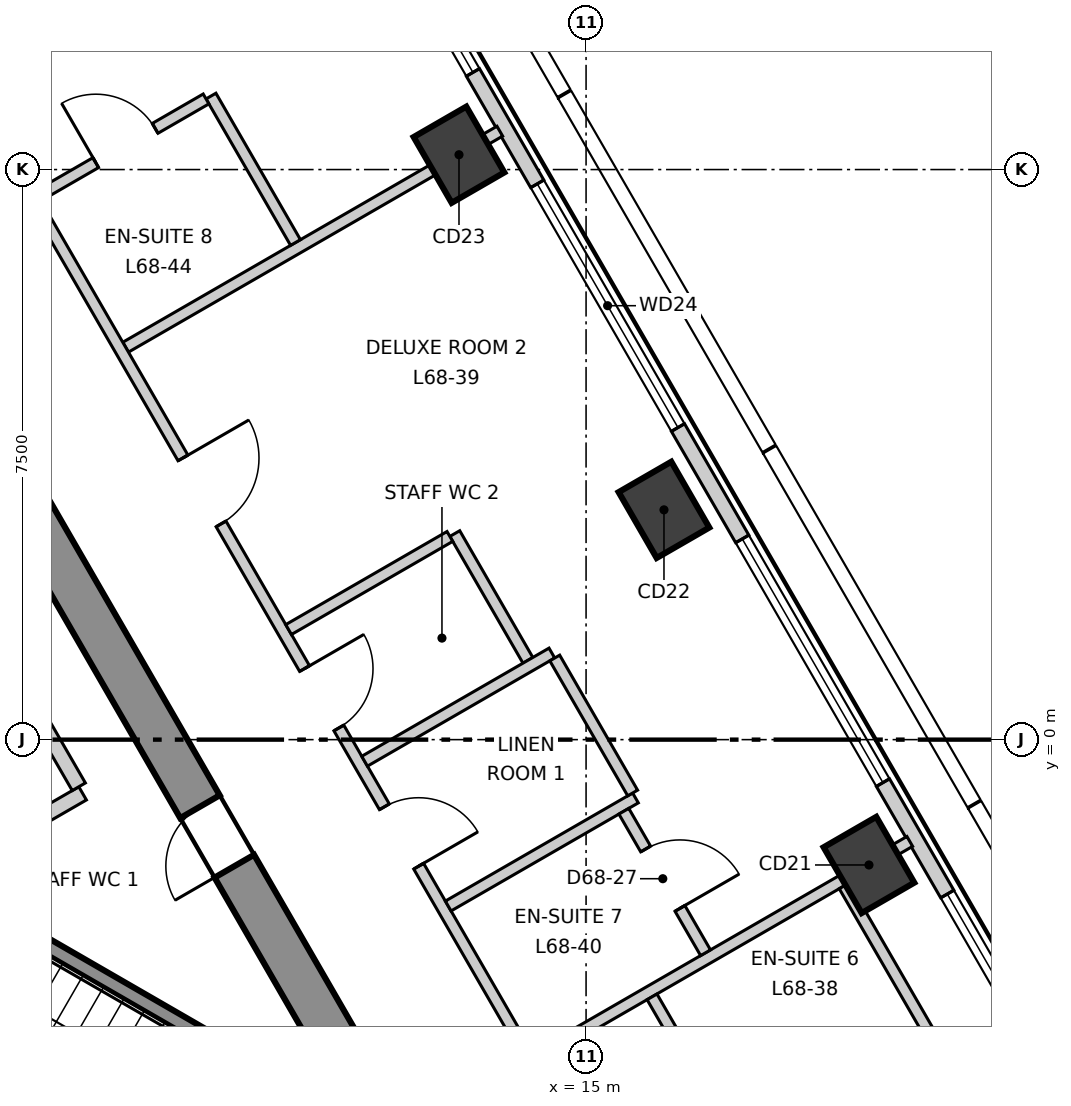
"""IFC4 building model, lengths in metres.
Left out: names, types, materials, properties, quantities, classifications, styles, units other than length and angle.
Written with IfcOpenShell. Run it as: python <this file> out.ifc"""

import sys

from ifc_helpers import new_model, si_unit, direction, frame, frame_2d, origin, origin_2d, place, context, subcontext, project, spatial, polyline, rectangle, outline, extrude, element, fill, save


model = new_model("IFC4")
c1 = context("Model", 3, precision=1e-05, world=origin(), true_north=direction((0.0, 1.0)))
c2 = subcontext(c1, "Body", "Model", "MODEL_VIEW")
j1 = project(units=[si_unit("LENGTHUNIT", "METRE"), si_unit("PLANEANGLEUNIT", "RADIAN")], contexts=[c1])
p1 = place(None, origin())
s1 = spatial("IfcSite", under=j1, at=p1, CompositionType="ELEMENT")
p2 = place(p1, origin())
s2 = spatial("IfcBuilding", under=s1, at=p2, CompositionType="ELEMENT")
p3 = place(p2, frame((0.0, 0.0, 289.9)))
s3 = spatial("IfcBuildingStorey", under=s2, at=p3, CompositionType="ELEMENT", Elevation=289.9)
p4 = place(p3, frame((12.384, -5.15, -0.3), z_axis=(0.0, 0.0, 1.0), x_axis=(-0.500000539815, 0.866025092122, 0.0)))
e1 = element("IfcWall", 1, at=p4, inside=s3, PredefinedType="SHEAR", context=c2, shape_type="SweptSolid", body=[
    extrude(outline(polyline([(-0.173, -0.301), (1.795, -0.301), (3.763, -0.301), (5.731, -0.301), (7.7, -0.301), (9.668, -0.301), (11.636, -0.301), (13.604, -0.3), (15.573, -0.3), (17.541, -0.3), (19.509, -0.3), (21.477, -0.3), (21.131, 0.3), (19.226, 0.3), (17.321, 0.3), (15.415, 0.3), (13.51, 0.3), (11.605, 0.3), (9.699, 0.3), (7.794, 0.3), (5.889, 0.3), (3.984, 0.3), (2.078, 0.3), (0.173, 0.3), (-0.173, -0.301)])), origin(), (0.0, 0.0, 1.0), 3.6),
])
p5 = place(p4, frame((16.378, 0.0, 0.3)))
e2 = element("IfcOpeningElement", 2, at=p5, cuts=e1, PredefinedType="OPENING", context=c2, shape_type="SweptSolid", body=[
    extrude(rectangle(XDim=0.9, YDim=2.1, at=frame_2d((0.45, 1.05))), frame((0.0, 0.31, 0.0), z_axis=(0.0, -1.0, 0.0), x_axis=(1.0, 0.0, 0.0)), (0.0, 0.0, 1.0), 0.621),
])
p6 = place(p4, frame((4.026, 0.0, 0.3)))
e3 = element("IfcOpeningElement", 3, at=p6, cuts=e1, PredefinedType="OPENING", context=c2, shape_type="SweptSolid", body=[
    extrude(rectangle(XDim=0.9, YDim=2.1, at=frame_2d((0.45, 1.05))), frame((0.0, 0.31, 0.0), z_axis=(0.0, -1.0, 0.0), x_axis=(1.0, 0.0, 0.0)), (0.0, 0.0, 1.0), 0.621),
])
for number, where, z_axis, x_axis in (
    (4, (18.722, -1.649, -0.3), (0.0, 0.0, 1.0), (-0.5, 0.866, 0.0)),
    (5, (16.025, 3.023, -0.3), (0.0, 0.0, 1.0), (-0.5, 0.866, 0.0)),
    (6, (13.328, 7.695, -0.3), (0.0, 0.0, 1.0), (-0.5, 0.866, 0.0)),
):
    element("IfcColumn", number, at=place(p3, frame(where, z_axis=z_axis, x_axis=x_axis)), inside=s3, PredefinedType="COLUMN", context=c2, shape_type="SweptSolid", body=[
        extrude(rectangle(XDim=1.0, YDim=0.8, at=origin_2d()), origin(), (0.0, 0.0, 1.0), 3.6),
    ])
p7 = place(p3, frame((25.375, -11.77, 0.0), z_axis=(0.0, 0.0, 1.0), x_axis=(-0.500008134474, 0.866020707292, 0.0)))
e7 = element("IfcWall", 7, at=p7, inside=s3, PredefinedType="ELEMENTEDWALL", context=c2, shape_type="SweptSolid", body=[
    extrude(rectangle(XDim=45.741, YDim=0.2, at=frame_2d((22.871, 0.0))), origin(), (0.0, 0.0, 1.0), 3.3),
])
p8 = place(p7, frame((2.15, 0.0, 0.9)))
e8 = element("IfcOpeningElement", 8, at=p8, cuts=e7, PredefinedType="OPENING", context=c2, shape_type="SweptSolid", body=[
    extrude(rectangle(XDim=3.7, YDim=2.2, at=frame_2d((1.85, 1.1))), frame((0.0, 0.11, 0.0), z_axis=(0.0, -1.0, 0.0), x_axis=(1.0, 0.0, 0.0)), (0.0, 0.0, 1.0), 0.22),
])
p9 = place(p7, frame((7.544, 0.0, 0.9)))
e9 = element("IfcOpeningElement", 9, at=p9, cuts=e7, PredefinedType="OPENING", context=c2, shape_type="SweptSolid", body=[
    extrude(rectangle(XDim=3.7, YDim=2.2, at=frame_2d((1.85, 1.1))), frame((0.0, 0.11, 0.0), z_axis=(0.0, -1.0, 0.0), x_axis=(1.0, 0.0, 0.0)), (0.0, 0.0, 1.0), 0.22),
])
p10 = place(p7, frame((12.939, 0.0, 0.9)))
e10 = element("IfcOpeningElement", 10, at=p10, cuts=e7, PredefinedType="OPENING", context=c2, shape_type="SweptSolid", body=[
    extrude(rectangle(XDim=3.7, YDim=2.2, at=frame_2d((1.85, 1.1))), frame((0.0, 0.11, 0.0), z_axis=(0.0, -1.0, 0.0), x_axis=(1.0, 0.0, 0.0)), (0.0, 0.0, 1.0), 0.22),
])
p11 = place(p7, frame((18.333, 0.0, 0.9)))
e11 = element("IfcOpeningElement", 11, at=p11, cuts=e7, PredefinedType="OPENING", context=c2, shape_type="SweptSolid", body=[
    extrude(rectangle(XDim=3.7, YDim=2.2, at=frame_2d((1.85, 1.1))), frame((0.0, 0.11, 0.0), z_axis=(0.0, -1.0, 0.0), x_axis=(1.0, 0.0, 0.0)), (0.0, 0.0, 1.0), 0.22),
])
p12 = place(p7, frame((23.728, 0.0, 0.9)))
e12 = element("IfcOpeningElement", 12, at=p12, cuts=e7, PredefinedType="OPENING", context=c2, shape_type="SweptSolid", body=[
    extrude(rectangle(XDim=3.7, YDim=2.2, at=frame_2d((1.85, 1.1))), frame((0.0, 0.11, 0.0), z_axis=(0.0, -1.0, 0.0), x_axis=(1.0, 0.0, 0.0)), (0.0, 0.0, 1.0), 0.22),
])
p13 = place(p7, frame((29.122, 0.0, 0.9)))
e13 = element("IfcOpeningElement", 13, at=p13, cuts=e7, PredefinedType="OPENING", context=c2, shape_type="SweptSolid", body=[
    extrude(rectangle(XDim=3.7, YDim=2.2, at=frame_2d((1.85, 1.1))), frame((0.0, 0.11, 0.0), z_axis=(0.0, -1.0, 0.0), x_axis=(1.0, 0.0, 0.0)), (0.0, 0.0, 1.0), 0.22),
])
p14 = place(p7, frame((34.517, 0.0, 0.9)))
e14 = element("IfcOpeningElement", 14, at=p14, cuts=e7, PredefinedType="OPENING", context=c2, shape_type="SweptSolid", body=[
    extrude(rectangle(XDim=3.7, YDim=2.2, at=frame_2d((1.85, 1.1))), frame((0.0, 0.11, 0.0), z_axis=(0.0, -1.0, 0.0), x_axis=(1.0, 0.0, 0.0)), (0.0, 0.0, 1.0), 0.22),
])
p15 = place(p7, frame((39.911, 0.0, 0.9)))
e15 = element("IfcOpeningElement", 15, at=p15, cuts=e7, PredefinedType="OPENING", context=c2, shape_type="SweptSolid", body=[
    extrude(rectangle(XDim=3.7, YDim=2.2, at=frame_2d((1.85, 1.1))), frame((0.0, 0.11, 0.0), z_axis=(0.0, -1.0, 0.0), x_axis=(1.0, 0.0, 0.0)), (0.0, 0.0, 1.0), 0.22),
])
p16 = place(p3, frame((8.942, 5.163, 0.0), z_axis=(0.0, 0.0, 1.0), x_axis=(0.86606758311, 0.499926936147, 0.0)))
e16 = element("IfcWall", 16, at=p16, inside=s3, PredefinedType="PARTITIONING", context=c2, shape_type="SweptSolid", body=[
    extrude(rectangle(XDim=5.684, YDim=0.15, at=frame_2d((2.842, 0.0))), origin(), (0.0, 0.0, 1.0), 2.8),
])
p17 = place(p3, frame((0.075, 20.37, 0.0), z_axis=(0.0, 0.0, 1.0), x_axis=(0.500009775255, -0.866019759965, 0.0)))
e17 = element("IfcWall", 17, at=p17, inside=s3, PredefinedType="PARTITIONING", context=c2, shape_type="SweptSolid", body=[
    extrude(rectangle(XDim=35.207, YDim=0.15, at=frame_2d((17.604, 0.0))), origin(), (0.0, 0.0, 1.0), 3.3),
])
p18 = place(p17, frame((31.407, 0.0, 0.0)))
e18 = element("IfcOpeningElement", 18, at=p18, cuts=e17, PredefinedType="OPENING", context=c2, shape_type="SweptSolid", body=[
    extrude(rectangle(XDim=1.0, YDim=2.1, at=frame_2d((0.5, 1.05))), frame((0.0, 0.085, 0.0), z_axis=(0.0, -1.0, 0.0), x_axis=(1.0, 0.0, 0.0)), (0.0, 0.0, 1.0), 0.17),
])
p19 = place(p17, frame((19.243, 0.0, 0.0)))
e19 = element("IfcOpeningElement", 19, at=p19, cuts=e17, PredefinedType="OPENING", context=c2, shape_type="SweptSolid", body=[
    extrude(rectangle(XDim=1.0, YDim=2.1, at=frame_2d((0.5, 1.05))), frame((0.0, 0.085, 0.0), z_axis=(0.0, -1.0, 0.0), x_axis=(1.0, 0.0, 0.0)), (0.0, 0.0, 1.0), 0.17),
])
p20 = place(p17, frame((24.543, 0.0, 0.0)))
e20 = element("IfcOpeningElement", 20, at=p20, cuts=e17, PredefinedType="OPENING", context=c2, shape_type="SweptSolid", body=[
    extrude(rectangle(XDim=0.9, YDim=2.1, at=frame_2d((0.45, 1.05))), frame((0.0, 0.085, 0.0), z_axis=(0.0, -1.0, 0.0), x_axis=(1.0, 0.0, 0.0)), (0.0, 0.0, 1.0), 0.17),
])
p21 = place(p17, frame((22.443, 0.0, 0.0)))
e21 = element("IfcOpeningElement", 21, at=p21, cuts=e17, PredefinedType="OPENING", context=c2, shape_type="SweptSolid", body=[
    extrude(rectangle(XDim=0.9, YDim=2.1, at=frame_2d((0.45, 1.05))), frame((0.0, 0.085, 0.0), z_axis=(0.0, -1.0, 0.0), x_axis=(1.0, 0.0, 0.0)), (0.0, 0.0, 1.0), 0.17),
])
p22 = place(p17, frame((13.253, 0.0, 0.0)))
e22 = element("IfcOpeningElement", 22, at=p22, cuts=e17, PredefinedType="OPENING", context=c2, shape_type="SweptSolid", body=[
    extrude(rectangle(XDim=1.0, YDim=2.1, at=frame_2d((0.5, 1.05))), frame((0.0, 0.085, 0.0), z_axis=(0.0, -1.0, 0.0), x_axis=(1.0, 0.0, 0.0)), (0.0, 0.0, 1.0), 0.17),
])
p23 = place(p17, frame((5.559, 0.0, 0.0)))
e23 = element("IfcOpeningElement", 23, at=p23, cuts=e17, PredefinedType="OPENING", context=c2, shape_type="SweptSolid", body=[
    extrude(rectangle(XDim=1.0, YDim=2.1, at=frame_2d((0.5, 1.05))), frame((0.0, 0.085, 0.0), z_axis=(0.0, -1.0, 0.0), x_axis=(1.0, 0.0, 0.0)), (0.0, 0.0, 1.0), 0.17),
])
p24 = place(p3, frame((13.273, 2.711, 0.0), z_axis=(0.0, 0.0, 1.0), x_axis=(0.499671230855, -0.86621513555, 0.0)))
e24 = element("IfcWall", 24, at=p24, inside=s3, PredefinedType="PARTITIONING", context=c2, shape_type="SweptSolid", body=[
    extrude(rectangle(XDim=1.926, YDim=0.15, at=frame_2d((0.963, 0.0))), origin(), (0.0, 0.0, 1.0), 3.3),
])
p25 = place(p3, frame((11.086, 1.448, 0.0), z_axis=(0.0, 0.0, 1.0), x_axis=(0.8660395779, 0.499975448907, 0.0)))
e25 = element("IfcWall", 25, at=p25, inside=s3, PredefinedType="PARTITIONING", context=c2, shape_type="SweptSolid", body=[
    extrude(rectangle(XDim=2.45, YDim=0.15, at=frame_2d((1.225, 0.0))), origin(), (0.0, 0.0, 1.0), 3.3),
])
p26 = place(p3, frame((12.086, -0.284, 0.0), z_axis=(0.0, 0.0, 1.0), x_axis=(0.865995540999, 0.500051720295, 0.0)))
e26 = element("IfcWall", 26, at=p26, inside=s3, PredefinedType="PARTITIONING", context=c2, shape_type="SweptSolid", body=[
    extrude(rectangle(XDim=2.845, YDim=0.15, at=frame_2d((1.423, 0.0))), origin(), (0.0, 0.0, 1.0), 3.3),
])
p27 = place(p3, frame((13.186, -2.189, 0.0), z_axis=(0.0, 0.0, 1.0), x_axis=(0.866122712398, 0.499831418649, 0.0)))
e27 = element("IfcWall", 27, at=p27, inside=s3, PredefinedType="PARTITIONING", context=c2, shape_type="SweptSolid", body=[
    extrude(rectangle(XDim=2.845, YDim=0.15, at=frame_2d((1.422, 0.0))), origin(), (0.0, 0.0, 1.0), 3.3),
])
p28 = place(p3, frame((14.336, -4.181, 0.0), z_axis=(0.0, 0.0, 1.0), x_axis=(0.86606758311, 0.499926936147, 0.0)))
e28 = element("IfcWall", 28, at=p28, inside=s3, PredefinedType="PARTITIONING", context=c2, shape_type="SweptSolid", body=[
    extrude(rectangle(XDim=5.684, YDim=0.15, at=frame_2d((2.842, 0.0))), origin(), (0.0, 0.0, 1.0), 3.3),
])
p29 = place(p3, frame((14.588, 1.074, 0.0), z_axis=(0.0, 0.0, 1.0), x_axis=(0.499942325911, -0.866058699375, 0.0)))
e29 = element("IfcWall", 29, at=p29, inside=s3, PredefinedType="PARTITIONING", context=c2, shape_type="SweptSolid", body=[
    extrude(rectangle(XDim=2.051, YDim=0.15, at=frame_2d((1.025, 0.0))), origin(), (0.0, 0.0, 1.0), 3.3),
])
p30 = place(p3, frame((10.065, 8.467, 0.0), z_axis=(0.0, 0.0, 1.0), x_axis=(0.499833278392, -0.866121639155, 0.0)))
e30 = element("IfcWall", 30, at=p30, inside=s3, PredefinedType="PARTITIONING", context=c2, shape_type="SweptSolid", body=[
    extrude(rectangle(XDim=2.225, YDim=0.15, at=frame_2d((1.112, 0.0))), origin(), (0.0, 0.0, 1.0), 3.3),
])
p31 = place(p3, frame((15.497, -0.942, 0.0), z_axis=(0.0, 0.0, 1.0), x_axis=(0.499961633463, -0.866047553582, 0.0)))
e31 = element("IfcWall", 31, at=p31, inside=s3, PredefinedType="PARTITIONING", context=c2, shape_type="SweptSolid", body=[
    extrude(rectangle(XDim=2.15, YDim=0.15, at=frame_2d((1.075, 0.0))), origin(), (0.0, 0.0, 1.0), 3.3),
])
p32 = place(p31, frame((0.575, 0.0, 0.0)))
e32 = element("IfcOpeningElement", 32, at=p32, cuts=e31, PredefinedType="OPENING", context=c2, shape_type="SweptSolid", body=[
    extrude(rectangle(XDim=0.9, YDim=2.1, at=frame_2d((0.45, 1.05))), frame((0.0, 0.085, 0.0), z_axis=(0.0, -1.0, 0.0), x_axis=(1.0, 0.0, 0.0)), (0.0, 0.0, 1.0), 0.17),
])
p33 = place(p3, frame((7.792, 7.154, 0.0), z_axis=(0.0, 0.0, 1.0), x_axis=(0.866006986733, 0.500031897912, 0.0)))
e33 = element("IfcWall", 33, at=p33, inside=s3, PredefinedType="PARTITIONING", context=c2, shape_type="SweptSolid", body=[
    extrude(rectangle(XDim=2.55, YDim=0.15, at=frame_2d((1.275, 0.0))), origin(), (0.0, 0.0, 1.0), 3.3),
])
p34 = place(p33, frame((0.875, 0.0, 0.0)))
e34 = element("IfcOpeningElement", 34, at=p34, cuts=e33, PredefinedType="OPENING", context=c2, shape_type="SweptSolid", body=[
    extrude(rectangle(XDim=0.9, YDim=2.1, at=frame_2d((0.45, 1.05))), frame((0.0, 0.085, 0.0), z_axis=(0.0, -1.0, 0.0), x_axis=(1.0, 0.0, 0.0)), (0.0, 0.0, 1.0), 0.17),
])
p35 = place(p3, frame((18.396, -1.924, 0.0), z_axis=(0.0, 0.0, 1.0), x_axis=(0.500246986138, -0.865882759304, 0.0)))
e35 = element("IfcWall", 35, at=p35, inside=s3, PredefinedType="PARTITIONING", context=c2, shape_type="SweptSolid", body=[
    extrude(rectangle(XDim=2.525, YDim=0.15, at=frame_2d((1.262, 0.0))), origin(), (0.0, 0.0, 1.0), 2.6),
])
p36 = place(p3, frame((15.868, -3.384, 0.0), z_axis=(0.0, 0.0, 1.0), x_axis=(0.499956887143, -0.866050293573, 0.0)))
e36 = element("IfcWall", 36, at=p36, inside=s3, PredefinedType="PARTITIONING", context=c2, shape_type="SweptSolid", body=[
    extrude(rectangle(XDim=2.524, YDim=0.15, at=frame_2d((1.262, 0.0))), origin(), (0.0, 0.0, 1.0), 3.3),
])
p37 = place(p3, frame((6.642, -1.708, 0.0), z_axis=(0.0, 0.0, 1.0), x_axis=(0.866043441391, 0.499968756647, 0.0)))
e37 = element("IfcWall", 37, at=p37, inside=s3, PredefinedType="SOLIDWALL", context=c2, shape_type="SweptSolid", body=[
    extrude(rectangle(XDim=2.002, YDim=0.2, at=frame_2d((1.001, 0.0))), origin(), (0.0, 0.0, 1.0), 3.3),
])
p38 = place(p3, frame((6.826, 1.978, 0.0), z_axis=(0.0, 0.0, 1.0), x_axis=(0.499990139034, -0.866031096941, 0.0)))
e38 = element("IfcWall", 38, at=p38, inside=s3, PredefinedType="SOLIDWALL", context=c2, shape_type="SweptSolid", body=[
    extrude(rectangle(XDim=3.0, YDim=0.2, at=frame_2d((1.5, 0.0))), origin(), (0.0, 0.0, 1.0), 3.3),
])
p39 = place(p3, frame((6.529, -1.922, 0.0), z_axis=(0.0, 0.0, 1.0), x_axis=(0.866068467981, -0.499925403204, 0.0)))
e39 = element("IfcWall", 39, at=p39, inside=s3, PredefinedType="SOLIDWALL", context=c2, shape_type="SweptSolid", body=[
    extrude(rectangle(XDim=6.665, YDim=0.2, at=frame_2d((3.332, 0.0))), origin(), (0.0, 0.0, 1.0), 3.3),
])
p40 = place(p9, origin())
e40 = element("IfcWindow", 40, at=p40, inside=s3, PartitioningType="SINGLE_PANEL", PredefinedType="WINDOW", context=c2, shape_type="SweptSolid", body=[
    extrude(rectangle(XDim=3.7, YDim=2.2, at=frame_2d((1.85, 1.1))), frame((0.0, 0.03, 0.0), z_axis=(0.0, -1.0, 0.0), x_axis=(1.0, 0.0, 0.0)), (0.0, 0.0, 1.0), 0.06),
])
fill(e9, e40)
p41 = place(p10, origin())
e41 = element("IfcWindow", 41, at=p41, inside=s3, PartitioningType="SINGLE_PANEL", PredefinedType="WINDOW", context=c2, shape_type="SweptSolid", body=[
    extrude(rectangle(XDim=3.7, YDim=2.2, at=frame_2d((1.85, 1.1))), frame((0.0, 0.03, 0.0), z_axis=(0.0, -1.0, 0.0), x_axis=(1.0, 0.0, 0.0)), (0.0, 0.0, 1.0), 0.06),
])
fill(e10, e41)
p42 = place(p11, origin())
e42 = element("IfcWindow", 42, at=p42, inside=s3, PartitioningType="SINGLE_PANEL", PredefinedType="WINDOW", context=c2, shape_type="SweptSolid", body=[
    extrude(rectangle(XDim=3.7, YDim=2.2, at=frame_2d((1.85, 1.1))), frame((0.0, 0.03, 0.0), z_axis=(0.0, -1.0, 0.0), x_axis=(1.0, 0.0, 0.0)), (0.0, 0.0, 1.0), 0.06),
])
fill(e11, e42)
p43 = place(p12, origin())
e43 = element("IfcWindow", 43, at=p43, inside=s3, PartitioningType="SINGLE_PANEL", PredefinedType="WINDOW", context=c2, shape_type="SweptSolid", body=[
    extrude(rectangle(XDim=3.7, YDim=2.2, at=frame_2d((1.85, 1.1))), frame((0.0, 0.03, 0.0), z_axis=(0.0, -1.0, 0.0), x_axis=(1.0, 0.0, 0.0)), (0.0, 0.0, 1.0), 0.06),
])
fill(e12, e43)
p44 = place(p19, origin())
e44 = element("IfcDoor", 44, at=p44, inside=s3, OperationType="SINGLE_SWING_RIGHT", PredefinedType="DOOR", context=c2, shape_type="SweptSolid", body=[
    extrude(rectangle(XDim=1.0, YDim=2.1, at=frame_2d((0.5, 1.05))), frame((0.0, 0.025, 0.0), z_axis=(0.0, -1.0, 0.0), x_axis=(1.0, 0.0, 0.0)), (0.0, 0.0, 1.0), 0.05),
])
fill(e19, e44)
p45 = place(p32, origin())
e45 = element("IfcDoor", 45, at=p45, inside=s3, OperationType="SINGLE_SWING_LEFT", PredefinedType="DOOR", context=c2, shape_type="SweptSolid", body=[
    extrude(rectangle(XDim=0.9, YDim=2.1, at=frame_2d((0.45, 1.05))), frame((0.0, 0.025, 0.0), z_axis=(0.0, -1.0, 0.0), x_axis=(1.0, 0.0, 0.0)), (0.0, 0.0, 1.0), 0.05),
])
fill(e32, e45)
p46 = place(p20, origin())
e46 = element("IfcDoor", 46, at=p46, inside=s3, OperationType="SINGLE_SWING_LEFT", PredefinedType="DOOR", context=c2, shape_type="SweptSolid", body=[
    extrude(rectangle(XDim=0.9, YDim=2.1, at=frame_2d((0.45, 1.05))), frame((0.0, 0.025, 0.0), z_axis=(0.0, -1.0, 0.0), x_axis=(1.0, 0.0, 0.0)), (0.0, 0.0, 1.0), 0.05),
])
fill(e20, e46)
p47 = place(p21, origin())
e47 = element("IfcDoor", 47, at=p47, inside=s3, OperationType="SINGLE_SWING_RIGHT", PredefinedType="DOOR", context=c2, shape_type="SweptSolid", body=[
    extrude(rectangle(XDim=0.9, YDim=2.1, at=frame_2d((0.45, 1.05))), frame((0.0, 0.025, 0.0), z_axis=(0.0, -1.0, 0.0), x_axis=(1.0, 0.0, 0.0)), (0.0, 0.0, 1.0), 0.05),
])
fill(e21, e47)
p48 = place(p34, origin())
e48 = element("IfcDoor", 48, at=p48, inside=s3, OperationType="SINGLE_SWING_RIGHT", PredefinedType="DOOR", context=c2, shape_type="SweptSolid", body=[
    extrude(rectangle(XDim=0.9, YDim=2.1, at=frame_2d((0.45, 1.05))), frame((0.0, 0.025, 0.0), z_axis=(0.0, -1.0, 0.0), x_axis=(1.0, 0.0, 0.0)), (0.0, 0.0, 1.0), 0.05),
])
fill(e34, e48)
p49 = place(p6, origin())
e49 = element("IfcDoor", 49, at=p49, inside=s3, OperationType="SINGLE_SWING_RIGHT", PredefinedType="DOOR", context=c2, shape_type="SweptSolid", body=[
    extrude(rectangle(XDim=0.9, YDim=2.1, at=frame_2d((0.45, 1.05))), frame((0.0, 0.025, 0.0), z_axis=(0.0, -1.0, 0.0), x_axis=(1.0, 0.0, 0.0)), (0.0, 0.0, 1.0), 0.05),
])
fill(e3, e49)
save(model, sys.argv[1])
